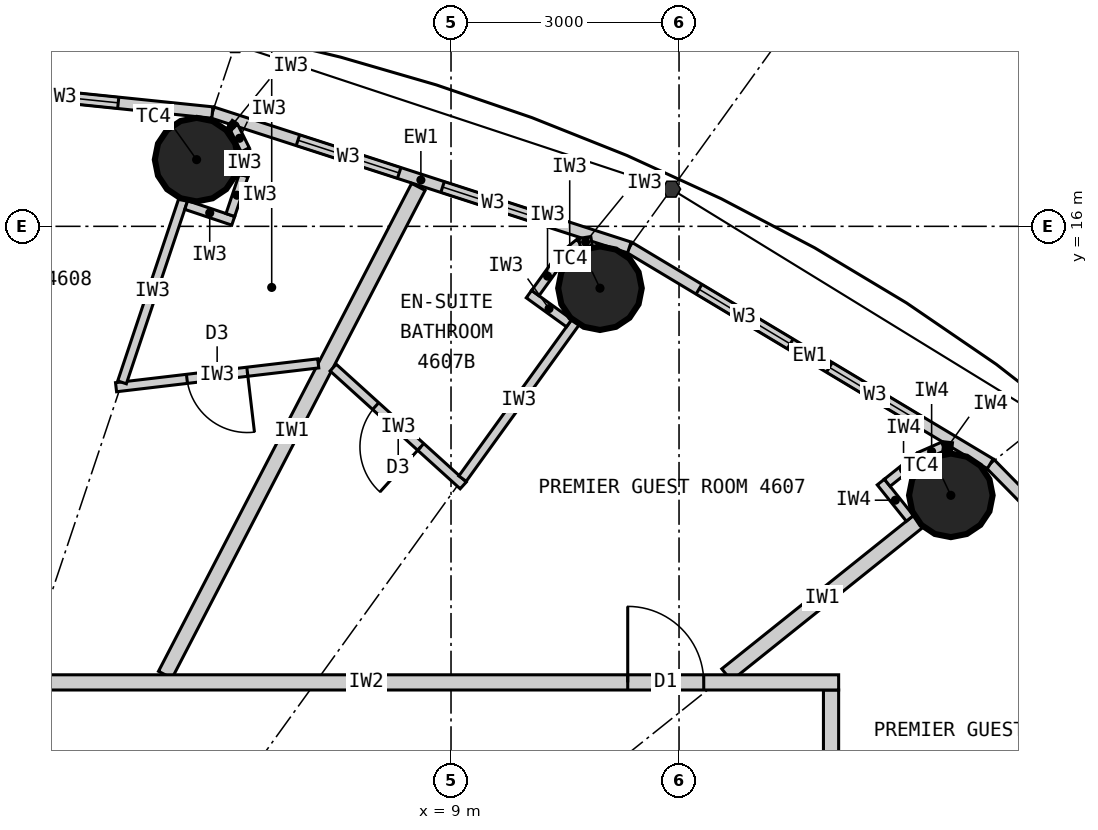
"""IFC4 building model, lengths in metres.
Left out: names, types, materials, properties, quantities, classifications, styles, units other than length and angle.
Written with IfcOpenShell. Run it as: python <this file> out.ifc"""

import sys

from ifc_helpers import new_model, si_unit, direction, frame, frame_2d, origin, origin_2d, place, context, subcontext, project, spatial, rectangle, circle, extrude, element, fill, save


model = new_model("IFC4")
c1 = context("Model", 3, precision=1e-05, world=origin(), true_north=direction((0.0, 1.0)))
c2 = subcontext(c1, "Body", "Model", "MODEL_VIEW")
j1 = project(units=[si_unit("LENGTHUNIT", "METRE"), si_unit("PLANEANGLEUNIT", "RADIAN")], contexts=[c1])
p1 = place(None, origin())
s1 = spatial("IfcSite", under=j1, at=p1, CompositionType="ELEMENT")
p2 = place(p1, origin())
s2 = spatial("IfcBuilding", under=s1, at=p2, CompositionType="ELEMENT")
p3 = place(p2, frame((0.0, 0.0, 173.1)))
s3 = spatial("IfcBuildingStorey", under=s2, at=p3, CompositionType="ELEMENT", Elevation=173.1)
for number, where, z_axis, x_axis in (
    (1, (15.576, 12.461, 0.0), (0.0, 0.0, 1.0), (1.0, 0.0, 0.0)),
    (2, (10.96, 15.186, 0.0), (0.0, 0.0, 1.0), (1.0, 0.0, 0.0)),
    (3, (5.653, 16.877, 0.0), (0.0, 0.0, 1.0), (1.0, 0.0, 0.0)),
):
    element("IfcColumn", number, at=place(p3, frame(where, z_axis=z_axis, x_axis=x_axis)), inside=s3, PredefinedType="COLUMN", context=c2, shape_type="SweptSolid", body=[
        extrude(circle(Radius=0.55, at=origin_2d()), origin(), (0.0, 0.0, 1.0), 3.3),
    ])
p4 = place(p3, frame((19.772, 9.132, 0.0), z_axis=(0.0, 0.0, 1.0), x_axis=(-0.700727467776, 0.71342905457, 0.0)))
e4 = element("IfcWall", 4, at=p4, inside=s3, PredefinedType="ELEMENTEDWALL", context=c2, shape_type="SweptSolid", body=[
    extrude(rectangle(XDim=5.247, YDim=0.15, at=frame_2d((2.624, 0.0))), origin(), (0.0, 0.0, 1.0), 3.12),
])
p5 = place(p4, frame((0.924, 0.0, 0.9)))
e5 = element("IfcOpeningElement", 5, at=p5, cuts=e4, PredefinedType="OPENING", context=c2, shape_type="SweptSolid", body=[
    extrude(rectangle(XDim=1.4, YDim=1.9, at=frame_2d((0.7, 0.95))), frame((0.0, 0.085, 0.0), z_axis=(0.0, -1.0, 0.0), x_axis=(1.0, 0.0, 0.0)), (0.0, 0.0, 1.0), 0.17),
])
p6 = place(p4, frame((2.924, 0.0, 0.9)))
e6 = element("IfcOpeningElement", 6, at=p6, cuts=e4, PredefinedType="OPENING", context=c2, shape_type="SweptSolid", body=[
    extrude(rectangle(XDim=1.4, YDim=1.9, at=frame_2d((0.7, 0.95))), frame((0.0, 0.085, 0.0), z_axis=(0.0, -1.0, 0.0), x_axis=(1.0, 0.0, 0.0)), (0.0, 0.0, 1.0), 0.17),
])
p7 = place(p3, frame((16.095, 12.876, 0.0), z_axis=(0.0, 0.0, 1.0), x_axis=(-0.857695199231, 0.514158482587, 0.0)))
e7 = element("IfcWall", 7, at=p7, inside=s3, PredefinedType="ELEMENTEDWALL", context=c2, shape_type="SweptSolid", body=[
    extrude(rectangle(XDim=5.536, YDim=0.15, at=frame_2d((2.768, 0.0))), origin(), (0.0, 0.0, 1.0), 3.12),
])
p8 = place(p7, frame((1.068, 0.0, 0.9)))
e8 = element("IfcOpeningElement", 8, at=p8, cuts=e7, PredefinedType="OPENING", context=c2, shape_type="SweptSolid", body=[
    extrude(rectangle(XDim=1.4, YDim=1.9, at=frame_2d((0.7, 0.95))), frame((0.0, 0.085, 0.0), z_axis=(0.0, -1.0, 0.0), x_axis=(1.0, 0.0, 0.0)), (0.0, 0.0, 1.0), 0.17),
])
p9 = place(p7, frame((3.068, 0.0, 0.9)))
e9 = element("IfcOpeningElement", 9, at=p9, cuts=e7, PredefinedType="OPENING", context=c2, shape_type="SweptSolid", body=[
    extrude(rectangle(XDim=1.4, YDim=1.9, at=frame_2d((0.7, 0.95))), frame((0.0, 0.085, 0.0), z_axis=(0.0, -1.0, 0.0), x_axis=(1.0, 0.0, 0.0)), (0.0, 0.0, 1.0), 0.17),
])
p10 = place(p3, frame((11.346, 15.722, 0.0), z_axis=(0.0, 0.0, 1.0), x_axis=(-0.951432482129, 0.307857486429, 0.0)))
e10 = element("IfcWall", 10, at=p10, inside=s3, PredefinedType="ELEMENTEDWALL", context=c2, shape_type="SweptSolid", body=[
    extrude(rectangle(XDim=5.766, YDim=0.15, at=frame_2d((2.883, 0.0))), origin(), (0.0, 0.0, 1.0), 3.12),
])
p11 = place(p10, frame((1.183, 0.0, 0.9)))
e11 = element("IfcOpeningElement", 11, at=p11, cuts=e10, PredefinedType="OPENING", context=c2, shape_type="SweptSolid", body=[
    extrude(rectangle(XDim=1.4, YDim=1.9, at=frame_2d((0.7, 0.95))), frame((0.0, 0.085, 0.0), z_axis=(0.0, -1.0, 0.0), x_axis=(1.0, 0.0, 0.0)), (0.0, 0.0, 1.0), 0.17),
])
p12 = place(p10, frame((3.183, 0.0, 0.9)))
e12 = element("IfcOpeningElement", 12, at=p12, cuts=e10, PredefinedType="OPENING", context=c2, shape_type="SweptSolid", body=[
    extrude(rectangle(XDim=1.4, YDim=1.9, at=frame_2d((0.7, 0.95))), frame((0.0, 0.085, 0.0), z_axis=(0.0, -1.0, 0.0), x_axis=(1.0, 0.0, 0.0)), (0.0, 0.0, 1.0), 0.17),
])
p13 = place(p3, frame((5.86, 17.497, 0.0), z_axis=(0.0, 0.0, 1.0), x_axis=(-0.994751738032, 0.102318032045, 0.0)))
e13 = element("IfcWall", 13, at=p13, inside=s3, PredefinedType="ELEMENTEDWALL", context=c2, shape_type="SweptSolid", body=[
    extrude(rectangle(XDim=5.891, YDim=0.15, at=frame_2d((2.946, 0.0))), origin(), (0.0, 0.0, 1.0), 3.12),
])
p14 = place(p13, frame((1.246, 0.0, 0.9)))
e14 = element("IfcOpeningElement", 14, at=p14, cuts=e13, PredefinedType="OPENING", context=c2, shape_type="SweptSolid", body=[
    extrude(rectangle(XDim=1.4, YDim=1.9, at=frame_2d((0.7, 0.95))), frame((0.0, 0.085, 0.0), z_axis=(0.0, -1.0, 0.0), x_axis=(1.0, 0.0, 0.0)), (0.0, 0.0, 1.0), 0.17),
])
p15 = place(p13, frame((3.246, 0.0, 0.9)))
e15 = element("IfcOpeningElement", 15, at=p15, cuts=e13, PredefinedType="OPENING", context=c2, shape_type="SweptSolid", body=[
    extrude(rectangle(XDim=1.4, YDim=1.9, at=frame_2d((0.7, 0.95))), frame((0.0, 0.085, 0.0), z_axis=(0.0, -1.0, 0.0), x_axis=(1.0, 0.0, 0.0)), (0.0, 0.0, 1.0), 0.17),
])
p16 = place(p3, frame((14.0, -9.9, 0.0), z_axis=(0.0, 0.0, 1.0), x_axis=(0.0, 1.0, 0.0)))
e16 = element("IfcWall", 16, at=p16, inside=s3, PredefinedType="PARTITIONING", context=c2, shape_type="SweptSolid", body=[
    extrude(rectangle(XDim=19.8, YDim=0.2, at=frame_2d((9.9, 0.0))), origin(), (0.0, 0.0, 1.0), 3.12),
])
p17 = place(p16, frame((3.688, 0.0, 0.0)))
e17 = element("IfcOpeningElement", 17, at=p17, cuts=e16, PredefinedType="OPENING", context=c2, shape_type="SweptSolid", body=[
    extrude(rectangle(XDim=1.0, YDim=2.2, at=frame_2d((0.5, 1.1))), frame((0.0, 0.11, 0.0), z_axis=(0.0, -1.0, 0.0), x_axis=(1.0, 0.0, 0.0)), (0.0, 0.0, 1.0), 0.22),
])
p18 = place(p16, frame((9.979, 0.0, 0.0)))
e18 = element("IfcOpeningElement", 18, at=p18, cuts=e16, PredefinedType="OPENING", context=c2, shape_type="SweptSolid", body=[
    extrude(rectangle(XDim=1.0, YDim=2.2, at=frame_2d((0.5, 1.1))), frame((0.0, 0.11, 0.0), z_axis=(0.0, -1.0, 0.0), x_axis=(1.0, 0.0, 0.0)), (0.0, 0.0, 1.0), 0.22),
])
p19 = place(p16, frame((17.122, 0.0, 0.0)))
e19 = element("IfcOpeningElement", 19, at=p19, cuts=e16, PredefinedType="OPENING", context=c2, shape_type="SweptSolid", body=[
    extrude(rectangle(XDim=1.0, YDim=2.2, at=frame_2d((0.5, 1.1))), frame((0.0, 0.11, 0.0), z_axis=(0.0, -1.0, 0.0), x_axis=(1.0, 0.0, 0.0)), (0.0, 0.0, 1.0), 0.22),
])
p20 = place(p3, frame((12.625, 10.1, 0.0), z_axis=(0.0, 0.0, 1.0), x_axis=(0.780876185034, 0.624685827954, 0.0)))
e20 = element("IfcWall", 20, at=p20, inside=s3, PredefinedType="PARTITIONING", context=c2, shape_type="SweptSolid", body=[
    extrude(rectangle(XDim=3.229, YDim=0.2, at=frame_2d((1.615, 0.0))), origin(), (0.0, 0.0, 1.0), 2.42),
])
p21 = place(p3, frame((5.24, 10.1, 0.0), z_axis=(0.0, 0.0, 1.0), x_axis=(0.460532965373, 0.887642601391, 0.0)))
e21 = element("IfcWall", 21, at=p21, inside=s3, PredefinedType="PARTITIONING", context=c2, shape_type="SweptSolid", body=[
    extrude(rectangle(XDim=7.231, YDim=0.2, at=frame_2d((3.616, 0.0))), origin(), (0.0, 0.0, 1.0), 3.12),
])
p22 = place(p3, frame((7.45, 14.142, 0.0), z_axis=(0.0, 0.0, 1.0), x_axis=(0.74113984586, -0.671350675041, 0.0)))
e22 = element("IfcWall", 22, at=p22, inside=s3, PredefinedType="PARTITIONING", context=c2, shape_type="SweptSolid", body=[
    extrude(rectangle(XDim=2.309, YDim=0.12, at=frame_2d((1.154, 0.0))), origin(), (0.0, 0.0, 1.0), 3.12),
])
p23 = place(p22, frame((0.754, 0.0, 0.0)))
e23 = element("IfcOpeningElement", 23, at=p23, cuts=e22, PredefinedType="OPENING", context=c2, shape_type="SweptSolid", body=[
    extrude(rectangle(XDim=0.8, YDim=2.1, at=frame_2d((0.4, 1.05))), frame((0.0, 0.07, 0.0), z_axis=(0.0, -1.0, 0.0), x_axis=(1.0, 0.0, 0.0)), (0.0, 0.0, 1.0), 0.14),
])
p24 = place(p3, frame((9.151, 12.681, 0.0), z_axis=(0.0, 0.0, 1.0), x_axis=(0.585258912334, 0.8108464747, 0.0)))
e24 = element("IfcWall", 24, at=p24, inside=s3, PredefinedType="PARTITIONING", context=c2, shape_type="SweptSolid", body=[
    extrude(rectangle(XDim=2.54, YDim=0.12, at=frame_2d((1.27, 0.0))), origin(), (0.0, 0.0, 1.0), 2.42),
])
p25 = place(p3, frame((10.554, 14.727, 0.0), z_axis=(0.0, 0.0, 1.0), x_axis=(-0.811044231224, 0.584984833135, 0.0)))
e25 = element("IfcWall", 25, at=p25, inside=s3, PredefinedType="PARTITIONING", context=c2, shape_type="SweptSolid", body=[
    extrude(rectangle(XDim=0.652, YDim=0.12, at=frame_2d((0.326, 0.0))), origin(), (0.0, 0.0, 1.0), 3.12),
])
p26 = place(p3, frame((10.109, 15.122, 0.0), z_axis=(0.0, 0.0, 1.0), x_axis=(0.585344718358, 0.810784534072, 0.0)))
e26 = element("IfcWall", 26, at=p26, inside=s3, PredefinedType="PARTITIONING", context=c2, shape_type="SweptSolid", body=[
    extrude(rectangle(XDim=0.55, YDim=0.12, at=frame_2d((0.275, 0.0))), origin(), (0.0, 0.0, 1.0), 3.12),
])
p27 = place(p3, frame((10.431, 15.568, 0.0), z_axis=(0.0, 0.0, 1.0), x_axis=(0.77505137267, 0.631898227345, 0.0)))
e27 = element("IfcWall", 27, at=p27, inside=s3, PredefinedType="PARTITIONING", context=c2, shape_type="SweptSolid", body=[
    extrude(rectangle(XDim=0.338, YDim=0.12, at=frame_2d((0.169, 0.0))), origin(), (0.0, 0.0, 1.0), 3.12),
])
p28 = place(p3, frame((10.693, 15.781, 0.0), z_axis=(0.0, 0.0, 1.0), x_axis=(0.987256785332, 0.159135287777, 0.0)))
e28 = element("IfcWall", 28, at=p28, inside=s3, PredefinedType="PARTITIONING", context=c2, shape_type="SweptSolid", body=[
    extrude(rectangle(XDim=0.158, YDim=0.12, at=frame_2d((0.079, 0.0))), origin(), (0.0, 0.0, 1.0), 3.12),
])
p29 = place(p3, frame((7.253, 14.197, 0.0), z_axis=(0.0, 0.0, 1.0), x_axis=(-0.993128188393, -0.117031625725, 0.0)))
e29 = element("IfcWall", 29, at=p29, inside=s3, PredefinedType="PARTITIONING", context=c2, shape_type="SweptSolid", body=[
    extrude(rectangle(XDim=2.678, YDim=0.12, at=frame_2d((1.339, 0.0))), origin(), (0.0, 0.0, 1.0), 3.12),
])
p30 = place(p29, frame((0.939, 0.0, 0.0)))
e30 = element("IfcOpeningElement", 30, at=p30, cuts=e29, PredefinedType="OPENING", context=c2, shape_type="SweptSolid", body=[
    extrude(rectangle(XDim=0.8, YDim=2.1, at=frame_2d((0.4, 1.05))), frame((0.0, 0.07, 0.0), z_axis=(0.0, -1.0, 0.0), x_axis=(1.0, 0.0, 0.0)), (0.0, 0.0, 1.0), 0.14),
])
p31 = place(p3, frame((4.671, 13.948, 0.0), z_axis=(0.0, 0.0, 1.0), x_axis=(0.317669167093, 0.948201613729, 0.0)))
e31 = element("IfcWall", 31, at=p31, inside=s3, PredefinedType="PARTITIONING", context=c2, shape_type="SweptSolid", body=[
    extrude(rectangle(XDim=2.54, YDim=0.12, at=frame_2d((1.27, 0.0))), origin(), (0.0, 0.0, 1.0), 2.42),
])
p32 = place(p3, frame((5.516, 16.28, 0.0), z_axis=(0.0, 0.0, 1.0), x_axis=(0.948157944392, -0.317799484717, 0.0)))
e32 = element("IfcWall", 32, at=p32, inside=s3, PredefinedType="PARTITIONING", context=c2, shape_type="SweptSolid", body=[
    extrude(rectangle(XDim=0.652, YDim=0.12, at=frame_2d((0.326, 0.0))), origin(), (0.0, 0.0, 1.0), 3.12),
])
p33 = place(p3, frame((6.097, 16.149, 0.0), z_axis=(0.0, 0.0, 1.0), x_axis=(0.317292604854, 0.948327687514, 0.0)))
e33 = element("IfcWall", 33, at=p33, inside=s3, PredefinedType="PARTITIONING", context=c2, shape_type="SweptSolid", body=[
    extrude(rectangle(XDim=0.55, YDim=0.12, at=frame_2d((0.275, 0.0))), origin(), (0.0, 0.0, 1.0), 3.12),
])
for number, where, z_axis, x_axis in (
    (34, (6.271, 16.67, 0.0), (0.0, 0.0, 1.0), (0.061, 0.998, 0.0)),
    (35, (6.292, 17.007, 0.0), (0.0, 0.0, 1.0), (-0.445, 0.895, 0.0)),
):
    element("IfcWall", number, at=place(p3, frame(where, z_axis=z_axis, x_axis=x_axis)), inside=s3, PredefinedType="PARTITIONING", context=c2, shape_type="SweptSolid", body=[
        extrude(rectangle(XDim=0.338, YDim=0.12, at=frame_2d((0.169, 0.0))), origin(), (0.0, 0.0, 1.0), 3.12),
    ])
p34 = place(p3, frame((6.142, 17.31, 0.0), z_axis=(0.0, 0.0, 1.0), x_axis=(-0.835039693181, 0.550189704386, 0.0)))
e36 = element("IfcWall", 36, at=p34, inside=s3, PredefinedType="PARTITIONING", context=c2, shape_type="SweptSolid", body=[
    extrude(rectangle(XDim=0.062, YDim=0.12, at=frame_2d((0.031, 0.0))), origin(), (0.0, 0.0, 1.0), 3.12),
])
p35 = place(p3, frame((1.67, 10.0, 0.0), z_axis=(0.0, 0.0, 1.0), x_axis=(1.0, 0.0, 0.0)))
e37 = element("IfcWall", 37, at=p35, inside=s3, PredefinedType="PARTITIONING", context=c2, shape_type="SweptSolid", body=[
    extrude(rectangle(XDim=12.43, YDim=0.2, at=frame_2d((6.215, 0.0))), origin(), (0.0, 0.0, 1.0), 3.12),
])
p36 = place(p35, frame((9.655, 0.0, 0.0)))
e38 = element("IfcOpeningElement", 38, at=p36, cuts=e37, PredefinedType="OPENING", context=c2, shape_type="SweptSolid", body=[
    extrude(rectangle(XDim=1.0, YDim=2.2, at=frame_2d((0.5, 1.1))), frame((0.0, 0.11, 0.0), z_axis=(0.0, -1.0, 0.0), x_axis=(1.0, 0.0, 0.0)), (0.0, 0.0, 1.0), 0.22),
])
p37 = place(p3, frame((15.037, 12.158, 0.0), z_axis=(0.0, 0.0, 1.0), x_axis=(-0.624840920722, 0.78075208856, 0.0)))
e39 = element("IfcWall", 39, at=p37, inside=s3, PredefinedType="PARTITIONING", context=c2, shape_type="SweptSolid", body=[
    extrude(rectangle(XDim=0.612, YDim=0.12, at=frame_2d((0.306, 0.0))), origin(), (0.0, 0.0, 1.0), 3.12),
])
p38 = place(p3, frame((14.739, 12.627, 0.0), z_axis=(0.0, 0.0, 1.0), x_axis=(0.780912119987, 0.624640905527, 0.0)))
e40 = element("IfcWall", 40, at=p38, inside=s3, PredefinedType="PARTITIONING", context=c2, shape_type="SweptSolid", body=[
    extrude(rectangle(XDim=0.55, YDim=0.12, at=frame_2d((0.275, 0.0))), origin(), (0.0, 0.0, 1.0), 3.12),
])
p39 = place(p3, frame((15.169, 12.97, 0.0), z_axis=(0.0, 0.0, 1.0), x_axis=(0.915974725257, 0.401235968838, 0.0)))
e41 = element("IfcWall", 41, at=p39, inside=s3, PredefinedType="PARTITIONING", context=c2, shape_type="SweptSolid", body=[
    extrude(rectangle(XDim=0.338, YDim=0.12, at=frame_2d((0.169, 0.0))), origin(), (0.0, 0.0, 1.0), 3.12),
])
p40 = place(p3, frame((15.478, 13.106, 0.0), z_axis=(0.0, 0.0, 1.0), x_axis=(0.993778813557, -0.111371763588, 0.0)))
e42 = element("IfcWall", 42, at=p40, inside=s3, PredefinedType="PARTITIONING", context=c2, shape_type="SweptSolid", body=[
    extrude(rectangle(XDim=0.114, YDim=0.12, at=frame_2d((0.057, 0.0))), origin(), (0.0, 0.0, 1.0), 3.12),
])
p41 = place(p8, origin())
e43 = element("IfcWindow", 43, at=p41, inside=s3, PartitioningType="SINGLE_PANEL", PredefinedType="WINDOW", context=c2, shape_type="SweptSolid", body=[
    extrude(rectangle(XDim=1.4, YDim=1.9, at=frame_2d((0.7, 0.95))), frame((0.0, 0.03, 0.0), z_axis=(0.0, -1.0, 0.0), x_axis=(1.0, 0.0, 0.0)), (0.0, 0.0, 1.0), 0.06),
])
fill(e8, e43)
p42 = place(p9, origin())
e44 = element("IfcWindow", 44, at=p42, inside=s3, PartitioningType="SINGLE_PANEL", PredefinedType="WINDOW", context=c2, shape_type="SweptSolid", body=[
    extrude(rectangle(XDim=1.4, YDim=1.9, at=frame_2d((0.7, 0.95))), frame((0.0, 0.03, 0.0), z_axis=(0.0, -1.0, 0.0), x_axis=(1.0, 0.0, 0.0)), (0.0, 0.0, 1.0), 0.06),
])
fill(e9, e44)
p43 = place(p11, origin())
e45 = element("IfcWindow", 45, at=p43, inside=s3, PartitioningType="SINGLE_PANEL", PredefinedType="WINDOW", context=c2, shape_type="SweptSolid", body=[
    extrude(rectangle(XDim=1.4, YDim=1.9, at=frame_2d((0.7, 0.95))), frame((0.0, 0.03, 0.0), z_axis=(0.0, -1.0, 0.0), x_axis=(1.0, 0.0, 0.0)), (0.0, 0.0, 1.0), 0.06),
])
fill(e11, e45)
p44 = place(p12, origin())
e46 = element("IfcWindow", 46, at=p44, inside=s3, PartitioningType="SINGLE_PANEL", PredefinedType="WINDOW", context=c2, shape_type="SweptSolid", body=[
    extrude(rectangle(XDim=1.4, YDim=1.9, at=frame_2d((0.7, 0.95))), frame((0.0, 0.03, 0.0), z_axis=(0.0, -1.0, 0.0), x_axis=(1.0, 0.0, 0.0)), (0.0, 0.0, 1.0), 0.06),
])
fill(e12, e46)
p45 = place(p14, origin())
e47 = element("IfcWindow", 47, at=p45, inside=s3, PartitioningType="SINGLE_PANEL", PredefinedType="WINDOW", context=c2, shape_type="SweptSolid", body=[
    extrude(rectangle(XDim=1.4, YDim=1.9, at=frame_2d((0.7, 0.95))), frame((0.0, 0.03, 0.0), z_axis=(0.0, -1.0, 0.0), x_axis=(1.0, 0.0, 0.0)), (0.0, 0.0, 1.0), 0.06),
])
fill(e14, e47)
p46 = place(p23, origin())
e48 = element("IfcDoor", 48, at=p46, inside=s3, OperationType="SINGLE_SWING_RIGHT", PredefinedType="DOOR", context=c2, shape_type="SweptSolid", body=[
    extrude(rectangle(XDim=0.8, YDim=2.1, at=frame_2d((0.4, 1.05))), frame((0.0, 0.025, 0.0), z_axis=(0.0, -1.0, 0.0), x_axis=(1.0, 0.0, 0.0)), (0.0, 0.0, 1.0), 0.05),
])
fill(e23, e48)
p47 = place(p36, origin())
e49 = element("IfcDoor", 49, at=p47, inside=s3, OperationType="SINGLE_SWING_LEFT", PredefinedType="DOOR", context=c2, shape_type="SweptSolid", body=[
    extrude(rectangle(XDim=1.0, YDim=2.2, at=frame_2d((0.5, 1.1))), frame((0.0, 0.025, 0.0), z_axis=(0.0, -1.0, 0.0), x_axis=(1.0, 0.0, 0.0)), (0.0, 0.0, 1.0), 0.05),
])
fill(e38, e49)
p48 = place(p30, origin())
e50 = element("IfcDoor", 50, at=p48, inside=s3, OperationType="SINGLE_SWING_LEFT", PredefinedType="DOOR", context=c2, shape_type="SweptSolid", body=[
    extrude(rectangle(XDim=0.8, YDim=2.1, at=frame_2d((0.4, 1.05))), frame((0.0, 0.025, 0.0), z_axis=(0.0, -1.0, 0.0), x_axis=(1.0, 0.0, 0.0)), (0.0, 0.0, 1.0), 0.05),
])
fill(e30, e50)
save(model, sys.argv[1])
